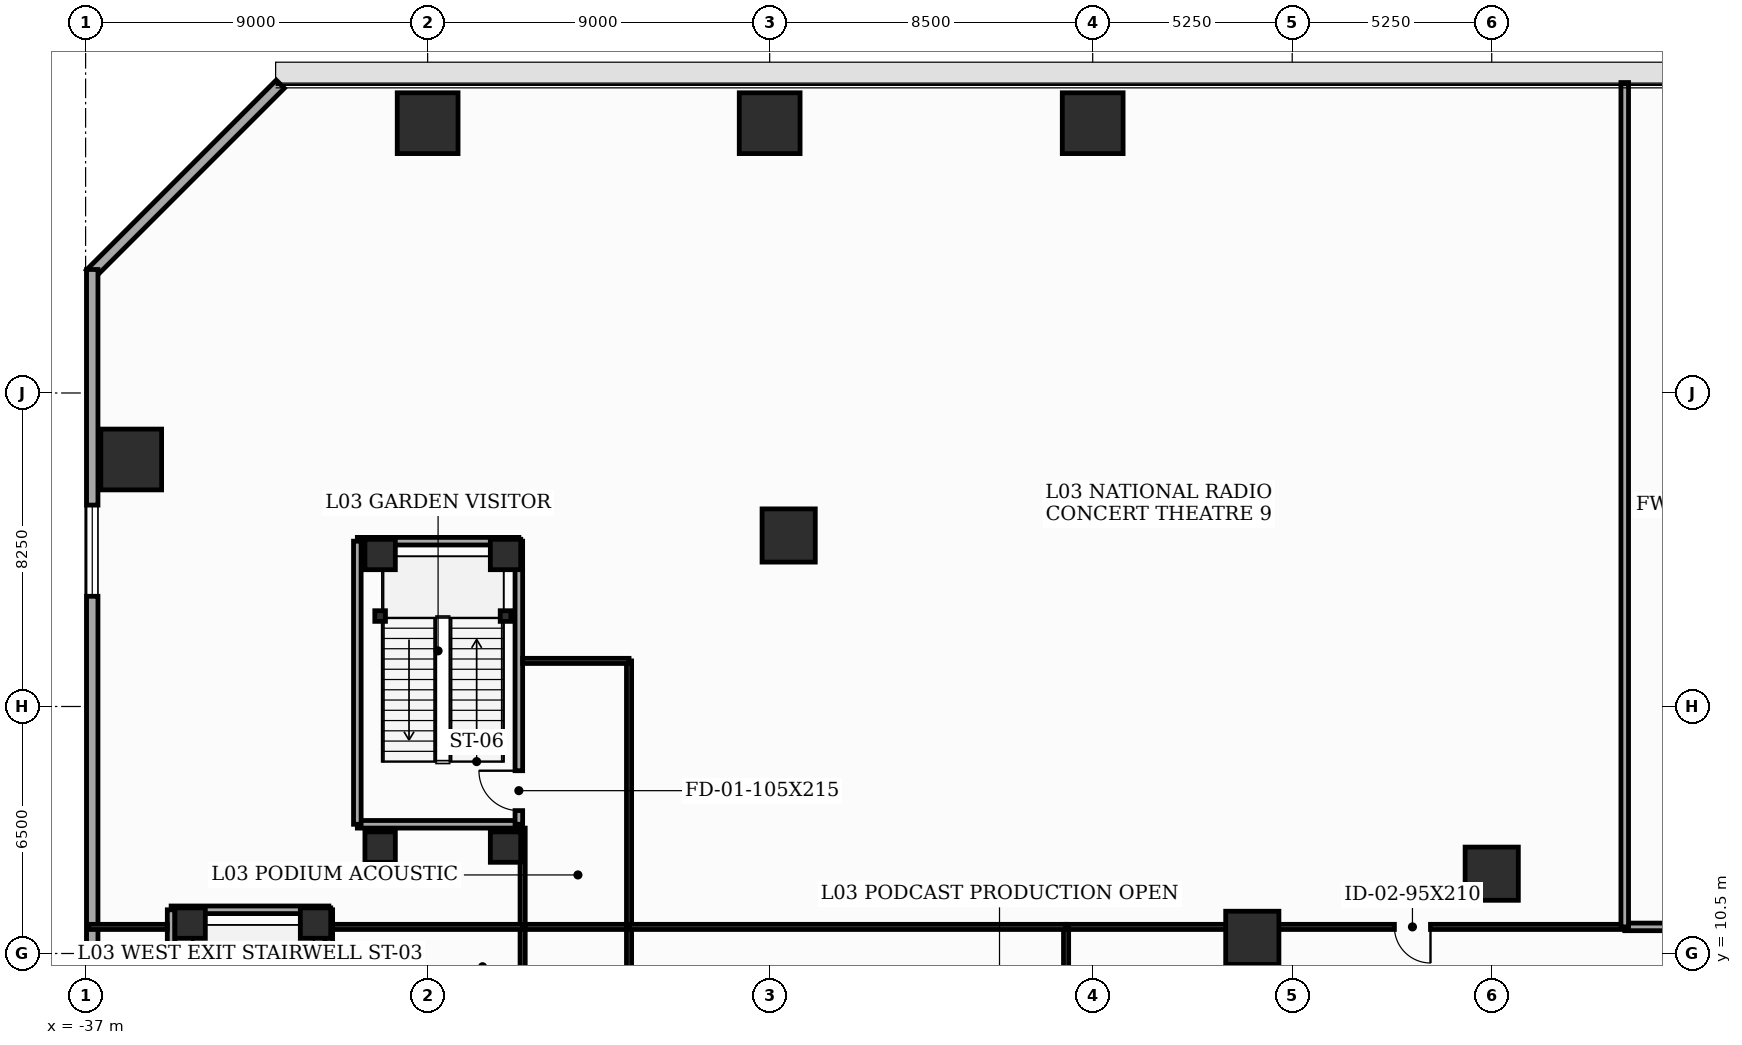
"""IFC4 building model, lengths in metres.
Left out: names, types, materials, properties, quantities, classifications, styles, units other than length and angle.
Written with IfcOpenShell. Run it as: python <this file> out.ifc"""

import sys

from ifc_helpers import new_model, si_unit, direction, frame, frame_2d, origin, origin_2d, place, context, subcontext, project, spatial, rectangle, i_section, extrude, element, fill, save


model = new_model("IFC4")
c1 = context("Model", 3, precision=1e-05, world=origin(), true_north=direction((0.0, 1.0)))
c2 = subcontext(c1, "Body", "Model", "MODEL_VIEW")
j1 = project(units=[si_unit("LENGTHUNIT", "METRE"), si_unit("PLANEANGLEUNIT", "RADIAN")], contexts=[c1])
p1 = place(None, origin())
s1 = spatial("IfcSite", under=j1, at=p1, CompositionType="ELEMENT")
p2 = place(p1, origin())
s2 = spatial("IfcBuilding", under=s1, at=p2, CompositionType="ELEMENT")
p3 = place(p2, frame((0.0, 0.0, 15.6)))
s3 = spatial("IfcBuildingStorey", under=s2, at=p3, CompositionType="ELEMENT", Elevation=15.6)
for number, where, z_axis, x_axis in (
    (1, (0.0, 12.6, 0.0), (0.0, 0.0, 1.0), (1.0, 0.0, 0.0)),
    (2, (-6.3, 10.912, 0.0), (0.0, 0.0, 1.0), (1.0, 0.0, 0.0)),
):
    element("IfcColumn", number, at=place(p3, frame(where, z_axis=z_axis, x_axis=x_axis)), inside=s3, PredefinedType="COLUMN", context=c2, shape_type="SweptSolid", body=[
        extrude(rectangle(XDim=1.4, YDim=1.4, at=origin_2d()), origin(), (0.0, 0.0, 1.0), 5.2),
    ])
for number, where, z_axis, x_axis in (
    (3, (-10.5, 32.35, 0.0), (0.0, 0.0, 1.0), (1.0, 0.0, 0.0)),
    (4, (-19.0, 32.35, 0.0), (0.0, 0.0, 1.0), (1.0, 0.0, 0.0)),
    (5, (-28.0, 32.35, 0.0), (0.0, 0.0, 1.0), (1.0, 0.0, 0.0)),
    (6, (-35.8, 23.5, 0.0), (0.0, 0.0, 1.0), (1.0, 0.0, 0.0)),
):
    element("IfcColumn", number, at=place(p3, frame(where, z_axis=z_axis, x_axis=x_axis)), inside=s3, PredefinedType="COLUMN", context=c2, shape_type="SweptSolid", body=[
        extrude(rectangle(XDim=1.6, YDim=1.6, at=origin_2d()), origin(), (0.0, 0.0, 1.0), 5.2),
    ])
p4 = place(p3, frame((-18.5, 21.5, 0.0), z_axis=(0.0, 0.0, 1.0), x_axis=(1.0, 0.0, 0.0)))
e7 = element("IfcColumn", 7, at=p4, inside=s3, PredefinedType="COLUMN", context=c2, shape_type="SweptSolid", body=[
    extrude(rectangle(XDim=1.4, YDim=1.4, at=origin_2d()), origin(), (0.0, 0.0, 1.0), 5.2),
])
for number, where, z_axis, x_axis in (
    (8, (-30.95, 11.3, 0.0), (0.0, 0.0, 1.0), (1.0, 0.0, 0.0)),
    (9, (-34.25, 11.3, 0.0), (0.0, 0.0, 1.0), (1.0, 0.0, 0.0)),
    (10, (-29.25, 13.3, 0.0), (0.0, 0.0, 1.0), (1.0, 0.0, 0.0)),
    (11, (-25.95, 13.3, 0.0), (0.0, 0.0, 1.0), (1.0, 0.0, 0.0)),
    (12, (-25.95, 21.0, 0.0), (0.0, 0.0, 1.0), (1.0, 0.0, 0.0)),
    (13, (-29.25, 21.0, 0.0), (0.0, 0.0, 1.0), (1.0, 0.0, 0.0)),
):
    element("IfcColumn", number, at=place(p3, frame(where, z_axis=z_axis, x_axis=x_axis)), inside=s3, PredefinedType="COLUMN", context=c2, shape_type="SweptSolid", body=[
        extrude(rectangle(XDim=0.8, YDim=0.8, at=origin_2d()), origin(), (0.0, 0.0, 1.0), 5.2),
    ])
for number, where, z_axis, x_axis in (
    (14, (-29.25, 19.38, 0.0), (0.0, 0.0, 1.0), (1.0, 0.0, 0.0)),
    (15, (-25.95, 19.38, 0.0), (0.0, 0.0, 1.0), (1.0, 0.0, 0.0)),
):
    element("IfcColumn", number, at=place(p3, frame(where, z_axis=z_axis, x_axis=x_axis)), inside=s3, PredefinedType="PILASTER", context=c2, shape_type="SweptSolid", body=[
        extrude(i_section(OverallWidth=0.28, OverallDepth=0.28, WebThickness=0.01, FlangeThickness=0.018, at=origin_2d()), origin(), (0.0, 0.0, 1.0), 5.2),
    ])
p5 = place(p3, frame((-31.876, 33.376, 0.0), z_axis=(0.0, 0.0, 1.0), x_axis=(-0.707106781187, -0.707106781187, 0.0)))
e16 = element("IfcWall", 16, at=p5, inside=s3, PredefinedType="SOLIDWALL", context=c2, shape_type="SweptSolid", body=[
    extrude(rectangle(XDim=7.071, YDim=0.3, at=frame_2d((3.536, 0.0))), origin(), (0.0, 0.0, 1.0), 4.95),
])
p6 = place(p3, frame((-36.825, 28.5, 0.0), z_axis=(0.0, 0.0, 1.0), x_axis=(0.0, -1.0, 0.0)))
e17 = element("IfcWall", 17, at=p6, inside=s3, PredefinedType="SOLIDWALL", context=c2, shape_type="SweptSolid", body=[
    extrude(rectangle(XDim=48.0, YDim=0.3, at=frame_2d((24.0, 0.0))), origin(), (0.0, 0.0, 1.0), 4.95),
])
p7 = place(p6, frame((6.2, 0.0, 0.9)))
e18 = element("IfcOpeningElement", 18, at=p7, cuts=e17, PredefinedType="OPENING", context=c2, shape_type="SweptSolid", body=[
    extrude(rectangle(XDim=2.4, YDim=1.35, at=frame_2d((1.2, 0.675))), frame((0.0, 0.16, 0.0), z_axis=(0.0, -1.0, 0.0), x_axis=(1.0, 0.0, 0.0)), (0.0, 0.0, 1.0), 0.32),
])
p8 = place(p6, frame((19.2, 0.0, 0.9)))
e19 = element("IfcOpeningElement", 19, at=p8, cuts=e17, PredefinedType="OPENING", context=c2, shape_type="SweptSolid", body=[
    extrude(rectangle(XDim=1.8, YDim=1.35, at=frame_2d((0.9, 0.675))), frame((0.0, 0.16, 0.0), z_axis=(0.0, -1.0, 0.0), x_axis=(1.0, 0.0, 0.0)), (0.0, 0.0, 1.0), 0.32),
])
p9 = place(p6, frame((36.2, 0.0, 0.9)))
e20 = element("IfcOpeningElement", 20, at=p9, cuts=e17, PredefinedType="OPENING", context=c2, shape_type="SweptSolid", body=[
    extrude(rectangle(XDim=2.4, YDim=1.35, at=frame_2d((1.2, 0.675))), frame((0.0, 0.16, 0.0), z_axis=(0.0, -1.0, 0.0), x_axis=(1.0, 0.0, 0.0)), (0.0, 0.0, 1.0), 0.32),
])
p10 = place(p3, frame((-30.6, 4.2, 0.0), z_axis=(0.0, 0.0, 1.0), x_axis=(0.0, 1.0, 0.0)))
e21 = element("IfcWall", 21, at=p10, inside=s3, PredefinedType="SOLIDWALL", context=c2, shape_type="SweptSolid", body=[
    extrude(rectangle(XDim=7.45, YDim=0.2, at=frame_2d((3.725, 0.0))), origin(), (0.0, 0.0, 1.0), 4.95),
])
p11 = place(p10, frame((0.36, 0.0, 0.0)))
e22 = element("IfcOpeningElement", 22, at=p11, cuts=e21, PredefinedType="OPENING", context=c2, shape_type="SweptSolid", body=[
    extrude(rectangle(XDim=1.05, YDim=2.15, at=frame_2d((0.525, 1.075))), frame((0.0, 0.11, 0.0), z_axis=(0.0, -1.0, 0.0), x_axis=(1.0, 0.0, 0.0)), (0.0, 0.0, 1.0), 0.22),
])
p12 = place(p3, frame((-30.6, 11.65, 0.0), z_axis=(0.0, 0.0, 1.0), x_axis=(-1.0, 0.0, 0.0)))
e23 = element("IfcWall", 23, at=p12, inside=s3, PredefinedType="SOLIDWALL", context=c2, shape_type="SweptSolid", body=[
    extrude(rectangle(XDim=4.15, YDim=0.2, at=frame_2d((2.075, 0.0))), origin(), (0.0, 0.0, 1.0), 4.95),
])
p13 = place(p3, frame((-34.75, 11.65, 0.0), z_axis=(0.0, 0.0, 1.0), x_axis=(0.0, -1.0, 0.0)))
e24 = element("IfcWall", 24, at=p13, inside=s3, PredefinedType="SOLIDWALL", context=c2, shape_type="SweptSolid", body=[
    extrude(rectangle(XDim=7.45, YDim=0.2, at=frame_2d((3.725, 0.0))), origin(), (0.0, 0.0, 1.0), 4.95),
])
p14 = place(p3, frame((-29.85, 13.9, 0.0), z_axis=(0.0, 0.0, 1.0), x_axis=(1.0, 0.0, 0.0)))
e25 = element("IfcWall", 25, at=p14, inside=s3, PredefinedType="SOLIDWALL", context=c2, shape_type="SweptSolid", body=[
    extrude(rectangle(XDim=4.25, YDim=0.2, at=frame_2d((2.125, 0.0))), origin(), (0.0, 0.0, 1.0), 4.435),
])
p15 = place(p3, frame((-25.6, 13.9, 0.0), z_axis=(0.0, 0.0, 1.0), x_axis=(0.0, 1.0, 0.0)))
e26 = element("IfcWall", 26, at=p15, inside=s3, PredefinedType="SOLIDWALL", context=c2, shape_type="SweptSolid", body=[
    extrude(rectangle(XDim=7.45, YDim=0.2, at=frame_2d((3.725, 0.0))), origin(), (0.0, 0.0, 1.0), 4.435),
])
p16 = place(p15, frame((0.36, 0.0, 0.0)))
e27 = element("IfcOpeningElement", 27, at=p16, cuts=e26, PredefinedType="OPENING", context=c2, shape_type="SweptSolid", body=[
    extrude(rectangle(XDim=1.05, YDim=2.15, at=frame_2d((0.525, 1.075))), frame((0.0, 0.11, 0.0), z_axis=(0.0, -1.0, 0.0), x_axis=(1.0, 0.0, 0.0)), (0.0, 0.0, 1.0), 0.22),
])
p17 = place(p3, frame((-25.6, 21.35, 0.0), z_axis=(0.0, 0.0, 1.0), x_axis=(-1.0, 0.0, 0.0)))
e28 = element("IfcWall", 28, at=p17, inside=s3, PredefinedType="SOLIDWALL", context=c2, shape_type="SweptSolid", body=[
    extrude(rectangle(XDim=4.25, YDim=0.2, at=frame_2d((2.125, 0.0))), origin(), (0.0, 0.0, 1.0), 4.95),
])
p18 = place(p3, frame((-29.85, 21.35, 0.0), z_axis=(0.0, 0.0, 1.0), x_axis=(0.0, -1.0, 0.0)))
e29 = element("IfcWall", 29, at=p18, inside=s3, PredefinedType="SOLIDWALL", context=c2, shape_type="SweptSolid", body=[
    extrude(rectangle(XDim=7.45, YDim=0.2, at=frame_2d((3.725, 0.0))), origin(), (0.0, 0.0, 1.0), 4.435),
])
p19 = place(p3, frame((-22.7, 11.2, 0.0), z_axis=(0.0, 0.0, 1.0), x_axis=(-1.0, 0.0, 0.0)))
e30 = element("IfcWall", 30, at=p19, inside=s3, PredefinedType="PARTITIONING", context=c2, shape_type="SweptSolid", body=[
    extrude(rectangle(XDim=2.8, YDim=0.135, at=frame_2d((1.4, 0.0))), origin(), (0.0, 0.0, 1.0), 4.95),
])
p20 = place(p3, frame((11.2, 11.2, 0.0), z_axis=(0.0, 0.0, 1.0), x_axis=(-1.0, 0.0, 0.0)))
e31 = element("IfcWall", 31, at=p20, inside=s3, PredefinedType="SOLIDWALL", context=c2, shape_type="SweptSolid", body=[
    extrude(rectangle(XDim=7.7, YDim=0.2, at=frame_2d((3.85, 0.0))), origin(), (0.0, 0.0, 1.0), 3.435),
])
p21 = place(p20, frame((1.681, 0.0, 0.0)))
e32 = element("IfcOpeningElement", 32, at=p21, cuts=e31, PredefinedType="OPENING", context=c2, shape_type="SweptSolid", body=[
    extrude(rectangle(XDim=0.95, YDim=2.1, at=frame_2d((0.475, 1.05))), frame((0.0, 0.11, 0.0), z_axis=(0.0, -1.0, 0.0), x_axis=(1.0, 0.0, 0.0)), (0.0, 0.0, 1.0), 0.22),
])
p22 = place(p3, frame((3.5, 11.2, 0.0), z_axis=(0.0, 0.0, 1.0), x_axis=(-1.0, 0.0, 0.0)))
e33 = element("IfcWall", 33, at=p22, inside=s3, PredefinedType="PARTITIONING", context=c2, shape_type="SweptSolid", body=[
    extrude(rectangle(XDim=14.7, YDim=0.135, at=frame_2d((7.35, 0.0))), origin(), (0.0, 0.0, 1.0), 3.435),
])
p23 = place(p22, frame((5.111, 0.0, 0.0)))
e34 = element("IfcOpeningElement", 34, at=p23, cuts=e33, PredefinedType="OPENING", context=c2, shape_type="SweptSolid", body=[
    extrude(rectangle(XDim=0.95, YDim=2.1, at=frame_2d((0.475, 1.05))), frame((0.0, 0.077, 0.0), z_axis=(0.0, -1.0, 0.0), x_axis=(1.0, 0.0, 0.0)), (0.0, 0.0, 1.0), 0.155),
])
for number, where, z_axis, x_axis in (
    (35, (-11.2, 11.2, 0.0), (0.0, 0.0, 1.0), (0.0, -1.0, 0.0)),
    (36, (-22.7, 8.4, 0.0), (0.0, 0.0, 1.0), (0.0, 1.0, 0.0)),
    (37, (-25.5, 11.2, 0.0), (0.0, 0.0, 1.0), (0.0, -1.0, 0.0)),
):
    element("IfcWall", number, at=place(p3, frame(where, z_axis=z_axis, x_axis=x_axis)), inside=s3, PredefinedType="PARTITIONING", context=c2, shape_type="SweptSolid", body=[
        extrude(rectangle(XDim=2.8, YDim=0.135, at=frame_2d((1.4, 0.0))), origin(), (0.0, 0.0, 1.0), 4.95),
    ])
p24 = place(p3, frame((-25.5, 13.8, 0.0), z_axis=(0.0, 0.0, 1.0), x_axis=(0.0, -1.0, 0.0)))
e38 = element("IfcWall", 38, at=p24, inside=s3, PredefinedType="PARTITIONING", context=c2, shape_type="SweptSolid", body=[
    extrude(rectangle(XDim=2.6, YDim=0.135, at=frame_2d((1.3, 0.0))), origin(), (0.0, 0.0, 1.0), 4.435),
])
p25 = place(p3, frame((-22.7, 11.2, 0.0), z_axis=(0.0, 0.0, 1.0), x_axis=(0.0, 1.0, 0.0)))
e39 = element("IfcWall", 39, at=p25, inside=s3, PredefinedType="PARTITIONING", context=c2, shape_type="SweptSolid", body=[
    extrude(rectangle(XDim=7.0, YDim=0.135, at=frame_2d((3.5, 0.0))), origin(), (0.0, 0.0, 1.0), 4.435),
])
p26 = place(p3, frame((-22.7, 18.2, 0.0), z_axis=(0.0, 0.0, 1.0), x_axis=(-1.0, 0.0, 0.0)))
e40 = element("IfcWall", 40, at=p26, inside=s3, PredefinedType="PARTITIONING", context=c2, shape_type="SweptSolid", body=[
    extrude(rectangle(XDim=2.8, YDim=0.135, at=frame_2d((1.4, 0.0))), origin(), (0.0, 0.0, 1.0), 4.95),
])
p27 = place(p3, frame((-34.85, 11.2, 0.0), z_axis=(0.0, 0.0, 1.0), x_axis=(-1.0, 0.0, 0.0)))
e41 = element("IfcWall", 41, at=p27, inside=s3, PredefinedType="PARTITIONING", context=c2, shape_type="SweptSolid", body=[
    extrude(rectangle(XDim=2.07, YDim=0.135, at=frame_2d((1.035, 0.0))), origin(), (0.0, 0.0, 1.0), 4.235),
])
p28 = place(p3, frame((3.5, 33.42, 0.0), z_axis=(0.0, 0.0, 1.0), x_axis=(0.0, -1.0, 0.0)))
e42 = element("IfcWall", 42, at=p28, inside=s3, PredefinedType="SOLIDWALL", context=c2, shape_type="SweptSolid", body=[
    extrude(rectangle(XDim=22.22, YDim=0.2, at=frame_2d((11.11, 0.0))), origin(), (0.0, 0.0, 1.0), 4.235),
])
p29 = place(p3, frame((-22.7, 11.2, 0.0), z_axis=(0.0, 0.0, 1.0), x_axis=(1.0, 0.0, 0.0)))
e43 = element("IfcWall", 43, at=p29, inside=s3, PredefinedType="PARTITIONING", context=c2, shape_type="SweptSolid", body=[
    extrude(rectangle(XDim=11.5, YDim=0.135, at=frame_2d((5.75, 0.0))), origin(), (0.0, 0.0, 1.0), 4.235),
])
p30 = place(p3, frame((-30.5, 11.2, 0.0), z_axis=(0.0, 0.0, 1.0), x_axis=(1.0, 0.0, 0.0)))
e44 = element("IfcWall", 44, at=p30, inside=s3, PredefinedType="PARTITIONING", context=c2, shape_type="SweptSolid", body=[
    extrude(rectangle(XDim=5.0, YDim=0.135, at=frame_2d((2.5, 0.0))), origin(), (0.0, 0.0, 1.0), 4.95),
])
p31 = place(p7, origin())
e45 = element("IfcWindow", 45, at=p31, inside=s3, PartitioningType="SINGLE_PANEL", PredefinedType="WINDOW", context=c2, shape_type="SweptSolid", body=[
    extrude(rectangle(XDim=2.4, YDim=1.35, at=frame_2d((1.2, 0.675))), frame((0.0, 0.03, 0.0), z_axis=(0.0, -1.0, 0.0), x_axis=(1.0, 0.0, 0.0)), (0.0, 0.0, 1.0), 0.06),
])
fill(e18, e45)
p32 = place(p16, origin())
e46 = element("IfcDoor", 46, at=p32, inside=s3, OperationType="SINGLE_SWING_RIGHT", PredefinedType="DOOR", context=c2, shape_type="SweptSolid", body=[
    extrude(rectangle(XDim=1.05, YDim=2.15, at=frame_2d((0.525, 1.075))), frame((0.0, 0.025, 0.0), z_axis=(0.0, -1.0, 0.0), x_axis=(1.0, 0.0, 0.0)), (0.0, 0.0, 1.0), 0.05),
])
fill(e27, e46)
p33 = place(p23, origin())
e47 = element("IfcDoor", 47, at=p33, inside=s3, OperationType="SINGLE_SWING_LEFT", PredefinedType="DOOR", context=c2, shape_type="SweptSolid", body=[
    extrude(rectangle(XDim=0.95, YDim=2.1, at=frame_2d((0.475, 1.05))), frame((0.0, 0.025, 0.0), z_axis=(0.0, -1.0, 0.0), x_axis=(1.0, 0.0, 0.0)), (0.0, 0.0, 1.0), 0.05),
])
fill(e34, e47)
save(model, sys.argv[1])
